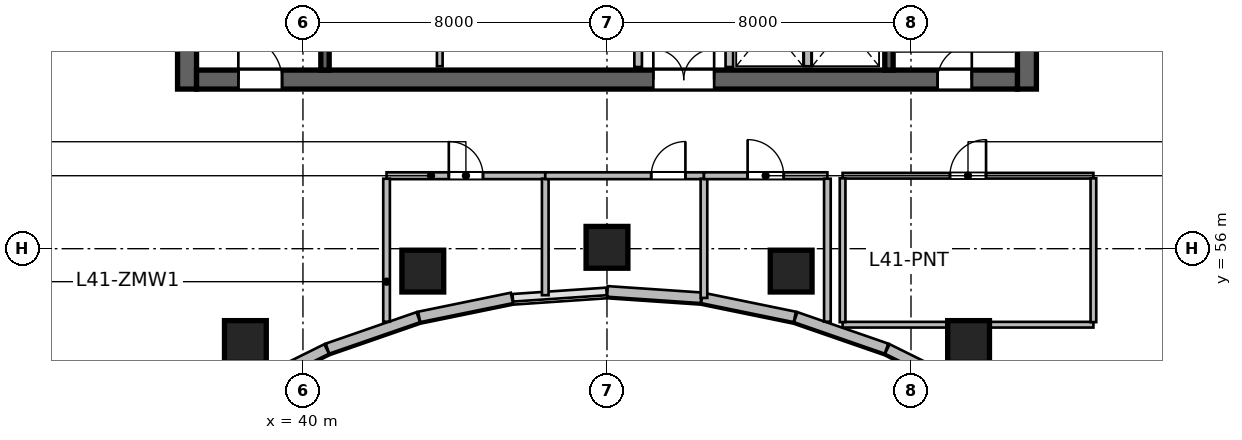
"""IFC4 building model, lengths in metres.
Left out: names, types, materials, properties, quantities, classifications, styles, units other than length and angle.
Written with IfcOpenShell. Run it as: python <this file> out.ifc"""

import sys

from ifc_helpers import new_model, si_unit, direction, frame, frame_2d, origin, origin_2d, place, context, subcontext, project, spatial, rectangle, circle, extrude, source, transform, mapped, element, fill, save


model = new_model("IFC4")
c1 = context("Model", 3, precision=1e-05, world=origin(), true_north=direction((0.0, 1.0)))
c2 = subcontext(c1, "Body", "Model", "MODEL_VIEW")
j1 = project(units=[si_unit("LENGTHUNIT", "METRE"), si_unit("PLANEANGLEUNIT", "RADIAN")], contexts=[c1])
p1 = place(None, origin())
s1 = spatial("IfcSite", under=j1, at=p1, CompositionType="ELEMENT")
p2 = place(p1, origin())
s2 = spatial("IfcBuilding", under=s1, at=p2, CompositionType="ELEMENT")
p3 = place(p2, frame((0.0, 0.0, 170.1)))
s3 = spatial("IfcBuildingStorey", under=s2, at=p3, CompositionType="ELEMENT", Elevation=170.1)
m1 = source(origin(), c2, "Body", "SweptSolid", [
    extrude(rectangle(XDim=12.0, YDim=0.5, at=frame_2d((6.0, 0.0))), origin(), (0.0, 0.0, 1.0), 3.9),
])
for number, where, z_axis, x_axis in (
    (1, (36.95, 60.2, 0.0), (0.0, 0.0, 1.0), (0.0, 1.0, 0.0)),
    (2, (59.05, 60.2, 0.0), (0.0, 0.0, 1.0), (0.0, 1.0, 0.0)),
):
    element("IfcWall", number, at=place(p3, frame(where, z_axis=z_axis, x_axis=x_axis)), inside=s3, PredefinedType="SHEAR", context=c2, shape_type="MappedRepresentation", body=[
        mapped(m1, transform((0.0, 0.0, 0.0), scale=1.0)),
    ])
m2 = source(origin(), c2, "Body", "SweptSolid", [
    extrude(rectangle(XDim=21.6, YDim=0.5, at=frame_2d((10.8, 0.0))), origin(), (0.0, 0.0, 1.0), 3.9),
])
p4 = place(p3, frame((37.2, 60.45, 0.0), z_axis=(0.0, 0.0, 1.0), x_axis=(1.0, 0.0, 0.0)))
e3 = element("IfcWall", 3, at=p4, inside=s3, PredefinedType="SHEAR", context=c2, shape_type="MappedRepresentation", body=[
    mapped(m2, transform((0.0, 0.0, 0.0), scale=1.0)),
])
p5 = place(p4, frame((1.1, 0.0, 0.0)))
e4 = element("IfcOpeningElement", 4, at=p5, cuts=e3, PredefinedType="OPENING", context=c2, shape_type="SweptSolid", body=[
    extrude(rectangle(XDim=1.15, YDim=2.15, at=frame_2d((0.575, 1.075))), frame((0.0, 0.26, 0.0), z_axis=(0.0, -1.0, 0.0), x_axis=(1.0, 0.0, 0.0)), (0.0, 0.0, 1.0), 0.52),
])
p6 = place(p4, frame((19.5, 0.0, 0.0)))
e5 = element("IfcOpeningElement", 5, at=p6, cuts=e3, PredefinedType="OPENING", context=c2, shape_type="SweptSolid", body=[
    extrude(rectangle(XDim=0.9, YDim=2.1, at=frame_2d((0.45, 1.05))), frame((0.0, 0.26, 0.0), z_axis=(0.0, -1.0, 0.0), x_axis=(1.0, 0.0, 0.0)), (0.0, 0.0, 1.0), 0.52),
])
p7 = place(p4, frame((12.02, 0.0, 0.0)))
e6 = element("IfcOpeningElement", 6, at=p7, cuts=e3, PredefinedType="OPENING", context=c2, shape_type="SweptSolid", body=[
    extrude(rectangle(XDim=1.6, YDim=2.15, at=frame_2d((0.8, 1.075))), frame((0.0, 0.26, 0.0), z_axis=(0.0, -1.0, 0.0), x_axis=(1.0, 0.0, 0.0)), (0.0, 0.0, 1.0), 0.52),
])
m3 = source(origin(), c2, "Body", "SweptSolid", [
    extrude(rectangle(XDim=11.0, YDim=0.22, at=frame_2d((5.5, 0.0))), origin(), (0.0, 0.0, 1.0), 3.9),
])
p8 = place(p3, frame((40.58, 60.7, 0.0), z_axis=(0.0, 0.0, 1.0), x_axis=(0.0, 1.0, 0.0)))
e7 = element("IfcWall", 7, at=p8, inside=s3, PredefinedType="SHEAR", context=c2, shape_type="MappedRepresentation", body=[
    mapped(m3, transform((0.0, 0.0, 0.0), scale=1.0)),
])
p9 = place(p3, frame((55.42, 60.7, 0.0), z_axis=(0.0, 0.0, 1.0), x_axis=(0.0, 1.0, 0.0)))
e8 = element("IfcWall", 8, at=p9, inside=s3, PredefinedType="SHEAR", context=c2, shape_type="MappedRepresentation", body=[
    mapped(m3, transform((0.0, 0.0, 0.0), scale=1.0)),
])
p10 = place(p9, frame((9.545, 0.0, 0.0)))
e9 = element("IfcOpeningElement", 9, at=p10, cuts=e8, PredefinedType="OPENING", context=c2, shape_type="SweptSolid", body=[
    extrude(rectangle(XDim=1.15, YDim=2.15, at=frame_2d((0.575, 1.075))), frame((0.0, 0.12, 0.0), z_axis=(0.0, -1.0, 0.0), x_axis=(1.0, 0.0, 0.0)), (0.0, 0.0, 1.0), 0.24),
])
m4 = source(origin(), c2, "Body", "SweptSolid", [
    extrude(circle(Radius=0.55, at=origin_2d()), origin(), (0.0, 0.0, 1.0), 3.9),
])
for number, where, z_axis, x_axis in (
    (10, (38.485, 53.558, 0.0), (0.0, 0.0, 1.0), (-0.289, 0.957, 0.0)),
    (11, (43.154, 55.411, 0.0), (0.0, 0.0, 1.0), (-0.143, 0.99, 0.0)),
    (12, (48.0, 56.036, 0.0), (0.0, 0.0, 1.0), (0.0, 1.0, 0.0)),
    (13, (52.846, 55.411, 0.0), (0.0, 0.0, 1.0), (0.143, 0.99, 0.0)),
    (14, (57.515, 53.558, 0.0), (0.0, 0.0, 1.0), (0.289, 0.957, 0.0)),
):
    element("IfcColumn", number, at=place(p3, frame(where, z_axis=z_axis, x_axis=x_axis)), inside=s3, PredefinedType="COLUMN", context=c2, shape_type="MappedRepresentation", body=[
        mapped(m4, transform((0.0, 0.0, 0.0), scale=1.0)),
    ])
m5 = source(origin(), c2, "Body", "SweptSolid", [
    extrude(rectangle(XDim=2.584, YDim=0.28, at=frame_2d((1.292, 0.0))), origin(), (0.0, 0.0, 1.0), 3.65),
])
p11 = place(p3, frame((57.692, 52.213, 0.0), z_axis=(0.0, 0.0, 1.0), x_axis=(-0.895989792847, 0.44407464588, 0.0)))
e15 = element("IfcWall", 15, at=p11, inside=s3, PredefinedType="SOLIDWALL", context=c2, shape_type="MappedRepresentation", body=[
    mapped(m5, transform((0.0, 0.0, 0.0), scale=1.0)),
])
m6 = source(origin(), c2, "Body", "SweptSolid", [
    extrude(rectangle(XDim=2.53, YDim=0.28, at=frame_2d((1.265, 0.0))), origin(), (0.0, 0.0, 1.0), 3.65),
])
p12 = place(p3, frame((55.355, 53.37, 0.0), z_axis=(0.0, 0.0, 1.0), x_axis=(-0.944872429646, 0.327438683872, 0.0)))
e16 = element("IfcWall", 16, at=p12, inside=s3, PredefinedType="SOLIDWALL", context=c2, shape_type="MappedRepresentation", body=[
    mapped(m6, transform((0.0, 0.0, 0.0), scale=1.0)),
])
m7 = source(origin(), c2, "Body", "SweptSolid", [
    extrude(rectangle(XDim=2.491, YDim=0.28, at=frame_2d((1.246, 0.0))), origin(), (0.0, 0.0, 1.0), 3.65),
])
p13 = place(p3, frame((52.942, 54.205, 0.0), z_axis=(0.0, 0.0, 1.0), x_axis=(-0.979630885979, 0.200806691214, 0.0)))
e17 = element("IfcWall", 17, at=p13, inside=s3, PredefinedType="SOLIDWALL", context=c2, shape_type="MappedRepresentation", body=[
    mapped(m7, transform((0.0, 0.0, 0.0), scale=1.0)),
])
m8 = source(origin(), c2, "Body", "SweptSolid", [
    extrude(rectangle(XDim=2.471, YDim=0.28, at=frame_2d((1.236, 0.0))), origin(), (0.0, 0.0, 1.0), 3.65),
])
p14 = place(p3, frame((50.478, 54.708, 0.0), z_axis=(0.0, 0.0, 1.0), x_axis=(-0.997708006929, 0.067666335123, 0.0)))
e18 = element("IfcWall", 18, at=p14, inside=s3, PredefinedType="SOLIDWALL", context=c2, shape_type="MappedRepresentation", body=[
    mapped(m8, transform((0.0, 0.0, 0.0), scale=1.0)),
])
p15 = place(p3, frame((45.498, 54.705, 0.0), z_axis=(0.0, 0.0, 1.0), x_axis=(-0.979630885979, -0.200806691214, 0.0)))
e19 = element("IfcWall", 19, at=p15, inside=s3, PredefinedType="SOLIDWALL", context=c2, shape_type="MappedRepresentation", body=[
    mapped(m7, transform((0.0, 0.0, 0.0), scale=1.0)),
])
p16 = place(p3, frame((43.035, 54.198, 0.0), z_axis=(0.0, 0.0, 1.0), x_axis=(-0.944872429646, -0.327438683872, 0.0)))
e20 = element("IfcWall", 20, at=p16, inside=s3, PredefinedType="SOLIDWALL", context=c2, shape_type="MappedRepresentation", body=[
    mapped(m6, transform((0.0, 0.0, 0.0), scale=1.0)),
])
p17 = place(p3, frame((40.624, 53.361, 0.0), z_axis=(0.0, 0.0, 1.0), x_axis=(-0.895989792847, -0.44407464588, 0.0)))
e21 = element("IfcWall", 21, at=p17, inside=s3, PredefinedType="SOLIDWALL", context=c2, shape_type="MappedRepresentation", body=[
    mapped(m5, transform((0.0, 0.0, 0.0), scale=1.0)),
])
m9 = source(origin(), c2, "Body", "SweptSolid", [
    extrude(rectangle(XDim=2.24, YDim=0.2, at=frame_2d((1.12, 0.0))), origin(), (0.0, 0.0, 1.0), 3.65),
])
for number, where, z_axis, x_axis in (
    (22, (48.82, 60.78, 0.0), (0.0, 0.0, 1.0), (0.0, 1.0, 0.0)),
    (23, (51.22, 60.78, 0.0), (0.0, 0.0, 1.0), (0.0, 1.0, 0.0)),
):
    element("IfcWall", number, at=place(p3, frame(where, z_axis=z_axis, x_axis=x_axis)), inside=s3, PredefinedType="SOLIDWALL", context=c2, shape_type="MappedRepresentation", body=[
        mapped(m9, transform((0.0, 0.0, 0.0), scale=1.0)),
    ])
m10 = source(origin(), c2, "Body", "SweptSolid", [
    extrude(rectangle(XDim=2.2, YDim=0.15, at=frame_2d((1.1, 0.0))), origin(), (0.0, 0.0, 1.0), 3.65),
])
p18 = place(p3, frame((43.6, 60.8, 0.0), z_axis=(0.0, 0.0, 1.0), x_axis=(0.0, 1.0, 0.0)))
e24 = element("IfcWall", 24, at=p18, inside=s3, PredefinedType="PARTITIONING", context=c2, shape_type="MappedRepresentation", body=[
    mapped(m10, transform((0.0, 0.0, 0.0), scale=1.0)),
])
m11 = source(origin(), c2, "Body", "SweptSolid", [
    extrude(rectangle(XDim=2.2, YDim=0.2, at=frame_2d((1.1, 0.0))), origin(), (0.0, 0.0, 1.0), 3.65),
])
p19 = place(p3, frame((53.28, 60.8, 0.0), z_axis=(0.0, 0.0, 1.0), x_axis=(0.0, 1.0, 0.0)))
e25 = element("IfcWall", 25, at=p19, inside=s3, PredefinedType="SOLIDWALL", context=c2, shape_type="MappedRepresentation", body=[
    mapped(m11, transform((0.0, 0.0, 0.0), scale=1.0)),
])
m12 = source(origin(), c2, "Body", "SweptSolid", [
    extrude(rectangle(XDim=4.176, YDim=0.18, at=frame_2d((2.088, 0.0))), origin(), (0.0, 0.0, 1.0), 3.65),
])
p20 = place(p3, frame((42.2, 57.92, 0.0), z_axis=(0.0, 0.0, 1.0), x_axis=(1.0, 0.0, 0.0)))
e26 = element("IfcWall", 26, at=p20, inside=s3, PredefinedType="PLUMBINGWALL", context=c2, shape_type="MappedRepresentation", body=[
    mapped(m12, transform((0.0, 0.0, 0.0), scale=1.0)),
])
p21 = place(p20, frame((1.638, 0.0, 0.0)))
e27 = element("IfcOpeningElement", 27, at=p21, cuts=e26, PredefinedType="OPENING", context=c2, shape_type="SweptSolid", body=[
    extrude(rectangle(XDim=0.9, YDim=2.08, at=frame_2d((0.45, 1.04))), frame((0.0, 0.1, 0.0), z_axis=(0.0, -1.0, 0.0), x_axis=(1.0, 0.0, 0.0)), (0.0, 0.0, 1.0), 0.2),
])
m13 = source(origin(), c2, "Body", "SweptSolid", [
    extrude(rectangle(XDim=3.763, YDim=0.175, at=frame_2d((1.881, 0.0))), origin(), (0.0, 0.0, 1.0), 3.65),
])
p22 = place(p3, frame((42.2, 54.079, 0.0), z_axis=(0.0, 0.0, 1.0), x_axis=(0.0, 1.0, 0.0)))
e28 = element("IfcWall", 28, at=p22, inside=s3, PredefinedType="PARTITIONING", context=c2, shape_type="MappedRepresentation", body=[
    mapped(m13, transform((0.0, 0.0, 0.0), scale=1.0)),
])
m14 = source(origin(), c2, "Body", "SweptSolid", [
    extrude(rectangle(XDim=3.065, YDim=0.175, at=frame_2d((1.533, 0.0))), origin(), (0.0, 0.0, 1.0), 3.65),
])
p23 = place(p3, frame((46.376, 54.776, 0.0), z_axis=(0.0, 0.0, 1.0), x_axis=(0.0, 1.0, 0.0)))
e29 = element("IfcWall", 29, at=p23, inside=s3, PredefinedType="PARTITIONING", context=c2, shape_type="MappedRepresentation", body=[
    mapped(m14, transform((0.0, 0.0, 0.0), scale=1.0)),
])
p24 = place(p3, frame((46.376, 57.92, 0.0), z_axis=(0.0, 0.0, 1.0), x_axis=(1.0, 0.0, 0.0)))
e30 = element("IfcWall", 30, at=p24, inside=s3, PredefinedType="PLUMBINGWALL", context=c2, shape_type="MappedRepresentation", body=[
    mapped(m12, transform((0.0, 0.0, 0.0), scale=1.0)),
])
p25 = place(p24, frame((2.788, 0.0, 0.0)))
e31 = element("IfcOpeningElement", 31, at=p25, cuts=e30, PredefinedType="OPENING", context=c2, shape_type="SweptSolid", body=[
    extrude(rectangle(XDim=0.9, YDim=2.08, at=frame_2d((0.45, 1.04))), frame((0.0, 0.1, 0.0), z_axis=(0.0, -1.0, 0.0), x_axis=(1.0, 0.0, 0.0)), (0.0, 0.0, 1.0), 0.2),
])
m15 = source(origin(), c2, "Body", "SweptSolid", [
    extrude(rectangle(XDim=3.136, YDim=0.175, at=frame_2d((1.568, 0.0))), origin(), (0.0, 0.0, 1.0), 3.65),
])
p26 = place(p3, frame((50.552, 54.705, 0.0), z_axis=(0.0, 0.0, 1.0), x_axis=(0.0, 1.0, 0.0)))
e32 = element("IfcWall", 32, at=p26, inside=s3, PredefinedType="PARTITIONING", context=c2, shape_type="MappedRepresentation", body=[
    mapped(m15, transform((0.0, 0.0, 0.0), scale=1.0)),
])
m16 = source(origin(), c2, "Body", "SweptSolid", [
    extrude(rectangle(XDim=3.248, YDim=0.18, at=frame_2d((1.624, 0.0))), origin(), (0.0, 0.0, 1.0), 3.65),
])
p27 = place(p3, frame((50.552, 57.92, 0.0), z_axis=(0.0, 0.0, 1.0), x_axis=(1.0, 0.0, 0.0)))
e33 = element("IfcWall", 33, at=p27, inside=s3, PredefinedType="PLUMBINGWALL", context=c2, shape_type="MappedRepresentation", body=[
    mapped(m16, transform((0.0, 0.0, 0.0), scale=1.0)),
])
p28 = place(p27, frame((1.149, 0.0, 0.0)))
e34 = element("IfcOpeningElement", 34, at=p28, cuts=e33, PredefinedType="OPENING", context=c2, shape_type="SweptSolid", body=[
    extrude(rectangle(XDim=0.95, YDim=2.12, at=frame_2d((0.475, 1.06))), frame((0.0, 0.1, 0.0), z_axis=(0.0, -1.0, 0.0), x_axis=(1.0, 0.0, 0.0)), (0.0, 0.0, 1.0), 0.2),
])
p29 = place(p3, frame((53.8, 54.079, 0.0), z_axis=(0.0, 0.0, 1.0), x_axis=(0.0, 1.0, 0.0)))
e35 = element("IfcWall", 35, at=p29, inside=s3, PredefinedType="PARTITIONING", context=c2, shape_type="MappedRepresentation", body=[
    mapped(m13, transform((0.0, 0.0, 0.0), scale=1.0)),
])
m17 = source(origin(), c2, "Body", "SweptSolid", [
    extrude(rectangle(XDim=6.6, YDim=0.15, at=frame_2d((3.3, 0.0))), origin(), (0.0, 0.0, 1.0), 3.095),
])
p30 = place(p3, frame((54.2, 54.0, 0.0), z_axis=(0.0, 0.0, 1.0), x_axis=(1.0, 0.0, 0.0)))
e36 = element("IfcWall", 36, at=p30, inside=s3, PredefinedType="PARTITIONING", context=c2, shape_type="MappedRepresentation", body=[
    mapped(m17, transform((0.0, 0.0, 0.0), scale=1.0)),
])
m18 = source(origin(), c2, "Body", "SweptSolid", [
    extrude(rectangle(XDim=6.6, YDim=0.15, at=frame_2d((3.3, 0.0))), origin(), (0.0, 0.0, 1.0), 3.65),
])
p31 = place(p3, frame((54.2, 57.92, 0.0), z_axis=(0.0, 0.0, 1.0), x_axis=(1.0, 0.0, 0.0)))
e37 = element("IfcWall", 37, at=p31, inside=s3, PredefinedType="PARTITIONING", context=c2, shape_type="MappedRepresentation", body=[
    mapped(m18, transform((0.0, 0.0, 0.0), scale=1.0)),
])
p32 = place(p31, frame((2.825, 0.0, 0.0)))
e38 = element("IfcOpeningElement", 38, at=p32, cuts=e37, PredefinedType="OPENING", context=c2, shape_type="SweptSolid", body=[
    extrude(rectangle(XDim=0.95, YDim=2.1, at=frame_2d((0.475, 1.05))), frame((0.0, 0.085, 0.0), z_axis=(0.0, -1.0, 0.0), x_axis=(1.0, 0.0, 0.0)), (0.0, 0.0, 1.0), 0.17),
])
m19 = source(origin(), c2, "Body", "SweptSolid", [
    extrude(rectangle(XDim=3.785, YDim=0.15, at=frame_2d((1.893, 0.0))), origin(), (0.0, 0.0, 1.0), 3.65),
])
for number, where, z_axis, x_axis in (
    (39, (54.2, 54.067, 0.0), (0.0, 0.0, 1.0), (0.0, 1.0, 0.0)),
    (40, (60.8, 54.067, 0.0), (0.0, 0.0, 1.0), (0.0, 1.0, 0.0)),
):
    element("IfcWall", number, at=place(p3, frame(where, z_axis=z_axis, x_axis=x_axis)), inside=s3, PredefinedType="PARTITIONING", context=c2, shape_type="MappedRepresentation", body=[
        mapped(m19, transform((0.0, 0.0, 0.0), scale=1.0)),
    ])
m20 = source(origin(), c2, "Body", "SweptSolid", [
    extrude(rectangle(XDim=1.15, YDim=2.15, at=frame_2d((0.575, 1.075))), frame((0.0, 0.025, 0.0), z_axis=(0.0, -1.0, 0.0), x_axis=(1.0, 0.0, 0.0)), (0.0, 0.0, 1.0), 0.05),
])
p33 = place(p5, origin())
e41 = element("IfcDoor", 41, at=p33, inside=s3, OperationType="SINGLE_SWING_LEFT", PredefinedType="DOOR", context=c2, shape_type="MappedRepresentation", body=[
    mapped(m20, transform((0.0, 0.0, 0.0), scale=1.0)),
])
fill(e4, e41)
m21 = source(origin(), c2, "Body", "SweptSolid", [
    extrude(rectangle(XDim=0.9, YDim=2.1, at=frame_2d((0.45, 1.05))), frame((0.0, 0.025, 0.0), z_axis=(0.0, -1.0, 0.0), x_axis=(1.0, 0.0, 0.0)), (0.0, 0.0, 1.0), 0.05),
])
p34 = place(p6, origin())
e42 = element("IfcDoor", 42, at=p34, inside=s3, OperationType="SINGLE_SWING_RIGHT", PredefinedType="DOOR", context=c2, shape_type="MappedRepresentation", body=[
    mapped(m21, transform((0.0, 0.0, 0.0), scale=1.0)),
])
fill(e5, e42)
m22 = source(origin(), c2, "Body", "SweptSolid", [
    extrude(rectangle(XDim=1.6, YDim=2.15, at=frame_2d((0.8, 1.075))), frame((0.0, 0.025, 0.0), z_axis=(0.0, -1.0, 0.0), x_axis=(1.0, 0.0, 0.0)), (0.0, 0.0, 1.0), 0.05),
])
p35 = place(p7, origin())
e43 = element("IfcDoor", 43, at=p35, inside=s3, OperationType="DOUBLE_DOOR_SINGLE_SWING", PredefinedType="DOOR", context=c2, shape_type="MappedRepresentation", body=[
    mapped(m22, transform((0.0, 0.0, 0.0), scale=1.0)),
])
fill(e6, e43)
m23 = source(origin(), c2, "Body", "SweptSolid", [
    extrude(rectangle(XDim=0.9, YDim=2.08, at=frame_2d((0.45, 1.04))), frame((0.0, 0.025, 0.0), z_axis=(0.0, -1.0, 0.0), x_axis=(1.0, 0.0, 0.0)), (0.0, 0.0, 1.0), 0.05),
])
p36 = place(p21, origin())
e44 = element("IfcDoor", 44, at=p36, inside=s3, OperationType="SINGLE_SWING_LEFT", PredefinedType="DOOR", context=c2, shape_type="MappedRepresentation", body=[
    mapped(m23, transform((0.0, 0.0, 0.0), scale=1.0)),
])
fill(e27, e44)
p37 = place(p25, origin())
e45 = element("IfcDoor", 45, at=p37, inside=s3, OperationType="SINGLE_SWING_RIGHT", PredefinedType="DOOR", context=c2, shape_type="MappedRepresentation", body=[
    mapped(m23, transform((0.0, 0.0, 0.0), scale=1.0)),
])
fill(e31, e45)
m24 = source(origin(), c2, "Body", "SweptSolid", [
    extrude(rectangle(XDim=0.95, YDim=2.12, at=frame_2d((0.475, 1.06))), frame((0.0, 0.025, 0.0), z_axis=(0.0, -1.0, 0.0), x_axis=(1.0, 0.0, 0.0)), (0.0, 0.0, 1.0), 0.05),
])
p38 = place(p28, origin())
e46 = element("IfcDoor", 46, at=p38, inside=s3, OperationType="SINGLE_SWING_LEFT", PredefinedType="DOOR", context=c2, shape_type="MappedRepresentation", body=[
    mapped(m24, transform((0.0, 0.0, 0.0), scale=1.0)),
])
fill(e34, e46)
m25 = source(origin(), c2, "Body", "SweptSolid", [
    extrude(rectangle(XDim=0.95, YDim=2.1, at=frame_2d((0.475, 1.05))), frame((0.0, 0.025, 0.0), z_axis=(0.0, -1.0, 0.0), x_axis=(1.0, 0.0, 0.0)), (0.0, 0.0, 1.0), 0.05),
])
p39 = place(p32, origin())
e47 = element("IfcDoor", 47, at=p39, inside=s3, OperationType="SINGLE_SWING_RIGHT", PredefinedType="DOOR", context=c2, shape_type="MappedRepresentation", body=[
    mapped(m25, transform((0.0, 0.0, 0.0), scale=1.0)),
])
fill(e38, e47)
save(model, sys.argv[1])
